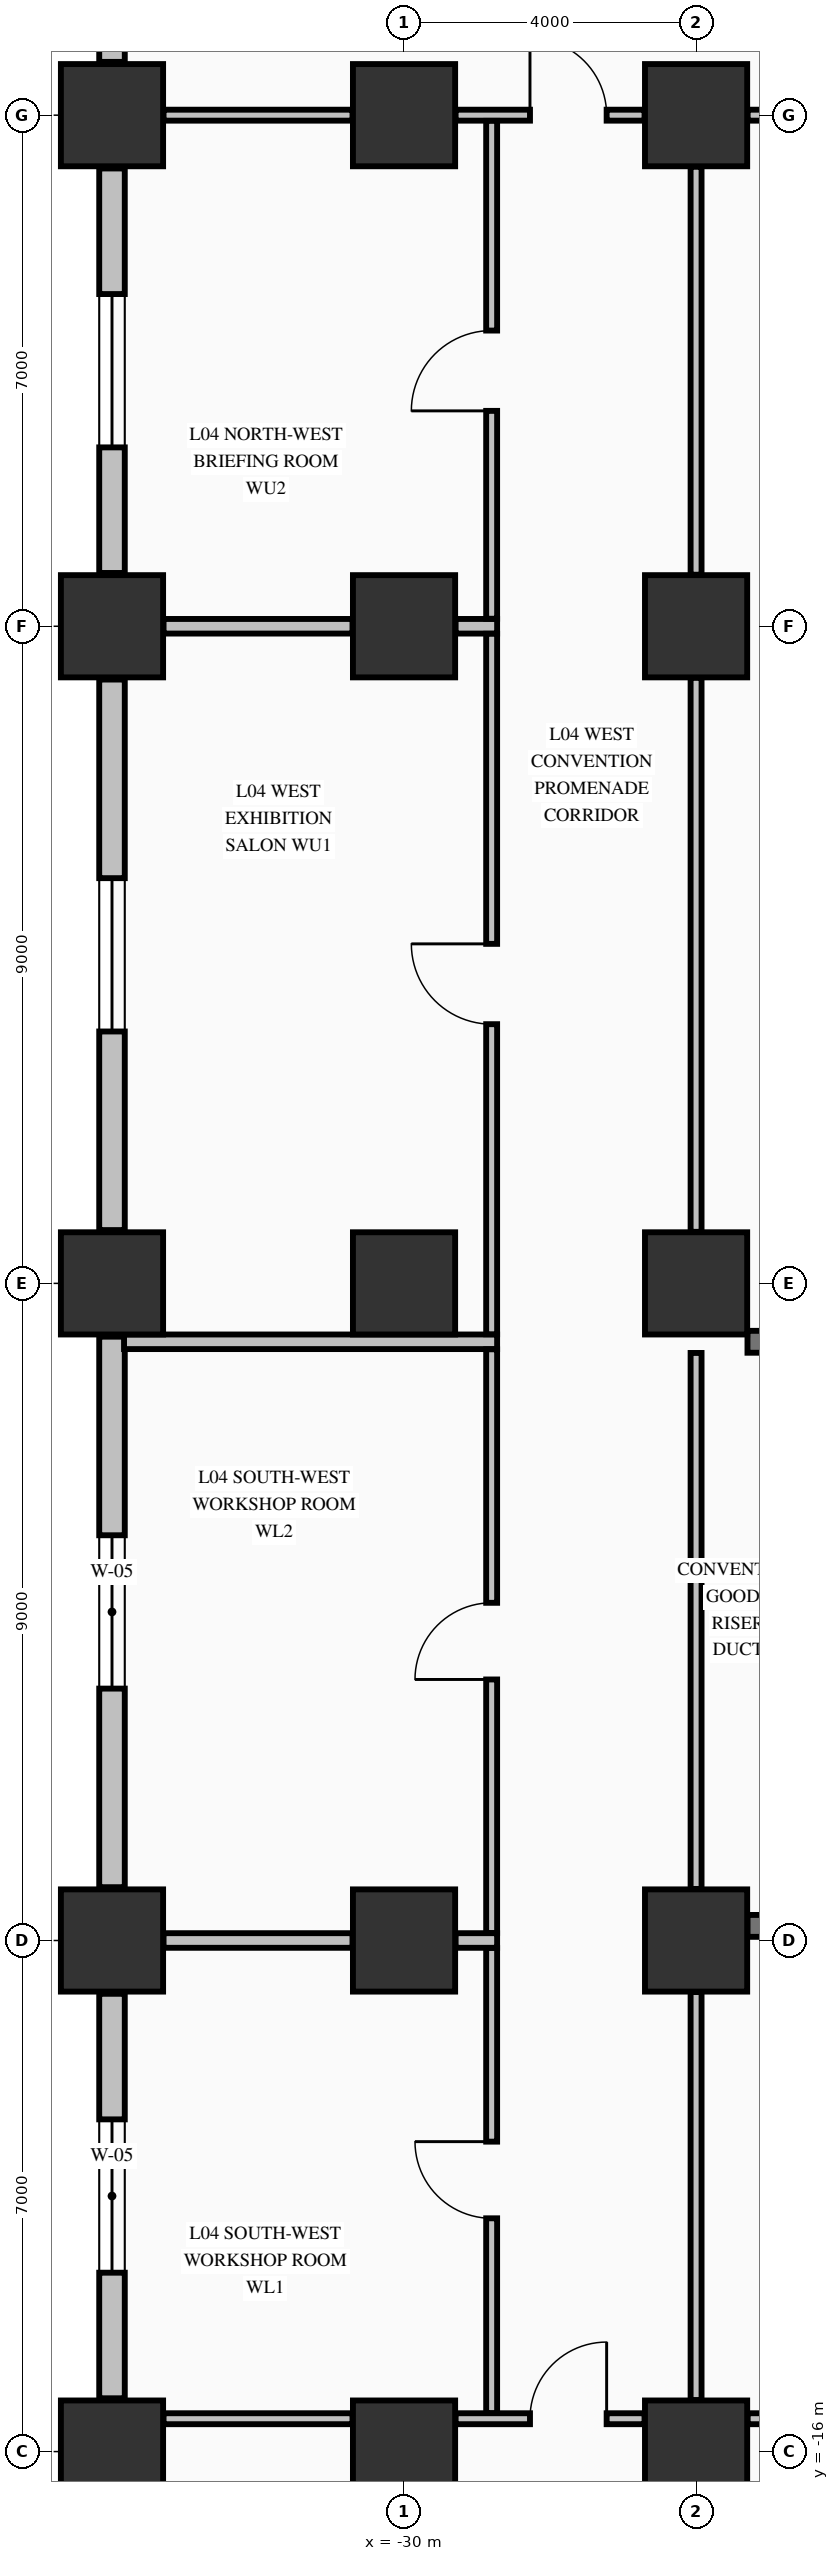
"""IFC4 building model, lengths in metres.
Left out: names, types, materials, properties, quantities, classifications, styles, units other than length and angle.
Written with IfcOpenShell. Run it as: python <this file> out.ifc"""

import sys

from ifc_helpers import new_model, si_unit, direction, frame, frame_2d, origin, origin_2d, place, context, subcontext, project, spatial, rectangle, extrude, element, fill, save


model = new_model("IFC4")
c1 = context("Model", 3, precision=1e-05, world=origin(), true_north=direction((0.0, 1.0)))
c2 = subcontext(c1, "Body", "Model", "MODEL_VIEW")
j1 = project(units=[si_unit("LENGTHUNIT", "METRE"), si_unit("PLANEANGLEUNIT", "RADIAN")], contexts=[c1])
p1 = place(None, origin())
s1 = spatial("IfcSite", under=j1, at=p1, CompositionType="ELEMENT")
p2 = place(p1, origin())
s2 = spatial("IfcBuilding", under=s1, at=p2, CompositionType="ELEMENT")
p3 = place(p2, frame((0.0, 0.0, 21.76)))
s3 = spatial("IfcBuildingStorey", under=s2, at=p3, CompositionType="ELEMENT", Elevation=21.76)
for number, where, z_axis, x_axis in (
    (1, (-34.0, -16.0, -0.45), (0.0, 0.0, 1.0), (1.0, 0.0, 0.0)),
    (2, (-34.0, -9.0, -0.45), (0.0, 0.0, 1.0), (1.0, 0.0, 0.0)),
    (3, (-34.0, 0.0, -0.45), (0.0, 0.0, 1.0), (1.0, 0.0, 0.0)),
    (4, (-34.0, 9.0, -0.45), (0.0, 0.0, 1.0), (1.0, 0.0, 0.0)),
    (5, (-34.0, 16.0, -0.45), (0.0, 0.0, 1.0), (1.0, 0.0, 0.0)),
    (6, (-30.0, -16.0, -0.45), (0.0, 0.0, 1.0), (1.0, 0.0, 0.0)),
    (7, (-30.0, -9.0, -0.45), (0.0, 0.0, 1.0), (1.0, 0.0, 0.0)),
    (8, (-30.0, 0.0, -0.45), (0.0, 0.0, 1.0), (1.0, 0.0, 0.0)),
    (9, (-30.0, 9.0, -0.45), (0.0, 0.0, 1.0), (1.0, 0.0, 0.0)),
    (10, (-30.0, 16.0, -0.45), (0.0, 0.0, 1.0), (1.0, 0.0, 0.0)),
    (11, (-26.0, -16.0, -0.45), (0.0, 0.0, 1.0), (1.0, 0.0, 0.0)),
    (12, (-26.0, -9.0, -0.45), (0.0, 0.0, 1.0), (1.0, 0.0, 0.0)),
    (13, (-26.0, 0.0, -0.45), (0.0, 0.0, 1.0), (1.0, 0.0, 0.0)),
    (14, (-26.0, 9.0, -0.45), (0.0, 0.0, 1.0), (1.0, 0.0, 0.0)),
    (15, (-26.0, 16.0, -0.45), (0.0, 0.0, 1.0), (1.0, 0.0, 0.0)),
):
    element("IfcColumn", number, at=place(p3, frame(where, z_axis=z_axis, x_axis=x_axis)), inside=s3, PredefinedType="COLUMN", context=c2, shape_type="SweptSolid", body=[
        extrude(rectangle(XDim=1.4, YDim=1.4, at=origin_2d()), origin(), (0.0, 0.0, 1.0), 5.44),
    ])
p4 = place(p3, frame((-34.0, -15.27, 0.0), z_axis=(0.0, 0.0, 1.0), x_axis=(0.0, 1.0, 0.0)))
e16 = element("IfcWall", 16, at=p4, inside=s3, PredefinedType="STANDARD", context=c2, shape_type="SweptSolid", body=[
    extrude(rectangle(XDim=5.54, YDim=0.35, at=frame_2d((2.77, 0.0))), origin(), (0.0, 0.0, 1.0), 3.332),
])
p5 = place(p4, frame((1.72, 0.0, 0.75)))
e17 = element("IfcOpeningElement", 17, at=p5, cuts=e16, PredefinedType="OPENING", context=c2, shape_type="SweptSolid", body=[
    extrude(rectangle(XDim=2.1, YDim=1.75, at=frame_2d((1.05, 0.875))), frame((0.0, 0.185, 0.0), z_axis=(0.0, -1.0, 0.0), x_axis=(1.0, 0.0, 0.0)), (0.0, 0.0, 1.0), 0.37),
])
p6 = place(p3, frame((-34.0, -8.27, 0.0), z_axis=(0.0, 0.0, 1.0), x_axis=(0.0, 1.0, 0.0)))
e18 = element("IfcWall", 18, at=p6, inside=s3, PredefinedType="STANDARD", context=c2, shape_type="SweptSolid", body=[
    extrude(rectangle(XDim=7.54, YDim=0.35, at=frame_2d((3.77, 0.0))), origin(), (0.0, 0.0, 1.0), 3.332),
])
p7 = place(p6, frame((2.72, 0.0, 0.75)))
e19 = element("IfcOpeningElement", 19, at=p7, cuts=e18, PredefinedType="OPENING", context=c2, shape_type="SweptSolid", body=[
    extrude(rectangle(XDim=2.1, YDim=1.75, at=frame_2d((1.05, 0.875))), frame((0.0, 0.185, 0.0), z_axis=(0.0, -1.0, 0.0), x_axis=(1.0, 0.0, 0.0)), (0.0, 0.0, 1.0), 0.37),
])
p8 = place(p3, frame((-34.0, 0.73, 0.0), z_axis=(0.0, 0.0, 1.0), x_axis=(0.0, 1.0, 0.0)))
e20 = element("IfcWall", 20, at=p8, inside=s3, PredefinedType="STANDARD", context=c2, shape_type="SweptSolid", body=[
    extrude(rectangle(XDim=7.54, YDim=0.35, at=frame_2d((3.77, 0.0))), origin(), (0.0, 0.0, 1.0), 3.332),
])
p9 = place(p8, frame((2.72, 0.0, 0.75)))
e21 = element("IfcOpeningElement", 21, at=p9, cuts=e20, PredefinedType="OPENING", context=c2, shape_type="SweptSolid", body=[
    extrude(rectangle(XDim=2.1, YDim=1.75, at=frame_2d((1.05, 0.875))), frame((0.0, 0.185, 0.0), z_axis=(0.0, -1.0, 0.0), x_axis=(1.0, 0.0, 0.0)), (0.0, 0.0, 1.0), 0.37),
])
p10 = place(p3, frame((-34.0, 9.73, 0.0), z_axis=(0.0, 0.0, 1.0), x_axis=(0.0, 1.0, 0.0)))
e22 = element("IfcWall", 22, at=p10, inside=s3, PredefinedType="STANDARD", context=c2, shape_type="SweptSolid", body=[
    extrude(rectangle(XDim=5.54, YDim=0.35, at=frame_2d((2.77, 0.0))), origin(), (0.0, 0.0, 1.0), 3.332),
])
p11 = place(p10, frame((1.72, 0.0, 0.75)))
e23 = element("IfcOpeningElement", 23, at=p11, cuts=e22, PredefinedType="OPENING", context=c2, shape_type="SweptSolid", body=[
    extrude(rectangle(XDim=2.1, YDim=1.75, at=frame_2d((1.05, 0.875))), frame((0.0, 0.185, 0.0), z_axis=(0.0, -1.0, 0.0), x_axis=(1.0, 0.0, 0.0)), (0.0, 0.0, 1.0), 0.37),
])
p12 = place(p3, frame((-34.0, 16.73, 0.0), z_axis=(0.0, 0.0, 1.0), x_axis=(0.0, 1.0, 0.0)))
e24 = element("IfcWall", 24, at=p12, inside=s3, PredefinedType="STANDARD", context=c2, shape_type="SweptSolid", body=[
    extrude(rectangle(XDim=4.54, YDim=0.35, at=frame_2d((2.27, 0.0))), origin(), (0.0, 0.0, 1.0), 3.332),
])
for number, where, z_axis, x_axis in (
    (25, (-25.296, -8.8, 0.0), (0.0, 0.0, 1.0), (1.0, 0.0, 0.0)),
    (26, (-25.296, -0.8, 0.0), (0.0, 0.0, 1.0), (1.0, 0.0, 0.0)),
):
    element("IfcWall", number, at=place(p3, frame(where, z_axis=z_axis, x_axis=x_axis)), inside=s3, PredefinedType="SHEAR", context=c2, shape_type="SweptSolid", body=[
        extrude(rectangle(XDim=3.046, YDim=0.3, at=frame_2d((1.523, 0.0))), origin(), (0.0, 0.0, 1.0), 4.99),
    ])
p13 = place(p3, frame((-33.294, -15.55, 0.0), z_axis=(0.0, 0.0, 1.0), x_axis=(1.0, 0.0, 0.0)))
e27 = element("IfcWall", 27, at=p13, inside=s3, PredefinedType="PARTITIONING", context=c2, shape_type="SweptSolid", body=[
    extrude(rectangle(XDim=2.588, YDim=0.15, at=frame_2d((1.294, 0.0))), origin(), (0.0, 0.0, 1.0), 3.332),
])
p14 = place(p3, frame((-29.294, -15.55, 0.0), z_axis=(0.0, 0.0, 1.0), x_axis=(1.0, 0.0, 0.0)))
e28 = element("IfcWall", 28, at=p14, inside=s3, PredefinedType="PARTITIONING", context=c2, shape_type="SweptSolid", body=[
    extrude(rectangle(XDim=2.588, YDim=0.15, at=frame_2d((1.294, 0.0))), origin(), (0.0, 0.0, 1.0), 3.332),
])
p15 = place(p14, frame((1.019, 0.0, 0.0)))
e29 = element("IfcOpeningElement", 29, at=p15, cuts=e28, PredefinedType="OPENING", context=c2, shape_type="SweptSolid", body=[
    extrude(rectangle(XDim=1.05, YDim=2.15, at=frame_2d((0.525, 1.075))), frame((0.0, 0.085, 0.0), z_axis=(0.0, -1.0, 0.0), x_axis=(1.0, 0.0, 0.0)), (0.0, 0.0, 1.0), 0.17),
])
p16 = place(p3, frame((-25.294, -15.55, 0.0), z_axis=(0.0, 0.0, 1.0), x_axis=(1.0, 0.0, 0.0)))
e30 = element("IfcWall", 30, at=p16, inside=s3, PredefinedType="PARTITIONING", context=c2, shape_type="SweptSolid", body=[
    extrude(rectangle(XDim=4.488, YDim=0.15, at=frame_2d((2.244, 0.0))), origin(), (0.0, 0.0, 1.0), 3.332),
])
p17 = place(p16, frame((0.619, 0.0, 0.0)))
e31 = element("IfcOpeningElement", 31, at=p17, cuts=e30, PredefinedType="OPENING", context=c2, shape_type="SweptSolid", body=[
    extrude(rectangle(XDim=0.95, YDim=2.15, at=frame_2d((0.475, 1.075))), frame((0.0, 0.085, 0.0), z_axis=(0.0, -1.0, 0.0), x_axis=(1.0, 0.0, 0.0)), (0.0, 0.0, 1.0), 0.17),
])
p18 = place(p3, frame((-33.294, -9.0, 0.0), z_axis=(0.0, 0.0, 1.0), x_axis=(1.0, 0.0, 0.0)))
e32 = element("IfcWall", 32, at=p18, inside=s3, PredefinedType="PARTITIONING", context=c2, shape_type="SweptSolid", body=[
    extrude(rectangle(XDim=2.588, YDim=0.2, at=frame_2d((1.294, 0.0))), origin(), (0.0, 0.0, 1.0), 3.332),
])
p19 = place(p3, frame((-29.294, -9.0, 0.0), z_axis=(0.0, 0.0, 1.0), x_axis=(1.0, 0.0, 0.0)))
e33 = element("IfcWall", 33, at=p19, inside=s3, PredefinedType="PARTITIONING", context=c2, shape_type="SweptSolid", body=[
    extrude(rectangle(XDim=0.569, YDim=0.2, at=frame_2d((0.284, 0.0))), origin(), (0.0, 0.0, 1.0), 3.332),
])
p20 = place(p3, frame((-33.835, -0.8, 0.0), z_axis=(0.0, 0.0, 1.0), x_axis=(1.0, 0.0, 0.0)))
e34 = element("IfcWall", 34, at=p20, inside=s3, PredefinedType="PARTITIONING", context=c2, shape_type="SweptSolid", body=[
    extrude(rectangle(XDim=5.11, YDim=0.2, at=frame_2d((2.555, 0.0))), origin(), (0.0, 0.0, 1.0), 4.99),
])
p21 = place(p3, frame((-33.294, 9.0, 0.0), z_axis=(0.0, 0.0, 1.0), x_axis=(1.0, 0.0, 0.0)))
e35 = element("IfcWall", 35, at=p21, inside=s3, PredefinedType="PARTITIONING", context=c2, shape_type="SweptSolid", body=[
    extrude(rectangle(XDim=2.588, YDim=0.2, at=frame_2d((1.294, 0.0))), origin(), (0.0, 0.0, 1.0), 3.332),
])
p22 = place(p3, frame((-29.294, 9.0, 0.0), z_axis=(0.0, 0.0, 1.0), x_axis=(1.0, 0.0, 0.0)))
e36 = element("IfcWall", 36, at=p22, inside=s3, PredefinedType="PARTITIONING", context=c2, shape_type="SweptSolid", body=[
    extrude(rectangle(XDim=0.569, YDim=0.2, at=frame_2d((0.284, 0.0))), origin(), (0.0, 0.0, 1.0), 3.332),
])
p23 = place(p3, frame((-33.294, 16.0, 0.0), z_axis=(0.0, 0.0, 1.0), x_axis=(1.0, 0.0, 0.0)))
e37 = element("IfcWall", 37, at=p23, inside=s3, PredefinedType="PARTITIONING", context=c2, shape_type="SweptSolid", body=[
    extrude(rectangle(XDim=2.588, YDim=0.15, at=frame_2d((1.294, 0.0))), origin(), (0.0, 0.0, 1.0), 3.332),
])
p24 = place(p3, frame((-29.294, 16.0, 0.0), z_axis=(0.0, 0.0, 1.0), x_axis=(1.0, 0.0, 0.0)))
e38 = element("IfcWall", 38, at=p24, inside=s3, PredefinedType="PARTITIONING", context=c2, shape_type="SweptSolid", body=[
    extrude(rectangle(XDim=2.588, YDim=0.15, at=frame_2d((1.294, 0.0))), origin(), (0.0, 0.0, 1.0), 3.332),
])
p25 = place(p24, frame((1.019, 0.0, 0.0)))
e39 = element("IfcOpeningElement", 39, at=p25, cuts=e38, PredefinedType="OPENING", context=c2, shape_type="SweptSolid", body=[
    extrude(rectangle(XDim=1.05, YDim=2.15, at=frame_2d((0.525, 1.075))), frame((0.0, 0.085, 0.0), z_axis=(0.0, -1.0, 0.0), x_axis=(1.0, 0.0, 0.0)), (0.0, 0.0, 1.0), 0.17),
])
p26 = place(p3, frame((-25.294, 16.0, 0.0), z_axis=(0.0, 0.0, 1.0), x_axis=(1.0, 0.0, 0.0)))
e40 = element("IfcWall", 40, at=p26, inside=s3, PredefinedType="PARTITIONING", context=c2, shape_type="SweptSolid", body=[
    extrude(rectangle(XDim=4.488, YDim=0.15, at=frame_2d((2.244, 0.0))), origin(), (0.0, 0.0, 1.0), 3.332),
])
p27 = place(p26, frame((3.238, 0.0, 0.0)))
e41 = element("IfcOpeningElement", 41, at=p27, cuts=e40, PredefinedType="OPENING", context=c2, shape_type="SweptSolid", body=[
    extrude(rectangle(XDim=1.1, YDim=2.15, at=frame_2d((0.55, 1.075))), frame((0.0, 0.085, 0.0), z_axis=(0.0, -1.0, 0.0), x_axis=(1.0, 0.0, 0.0)), (0.0, 0.0, 1.0), 0.17),
])
p28 = place(p3, frame((-28.8, -15.472, 0.0), z_axis=(0.0, 0.0, 1.0), x_axis=(0.0, 1.0, 0.0)))
e42 = element("IfcWall", 42, at=p28, inside=s3, PredefinedType="PARTITIONING", context=c2, shape_type="SweptSolid", body=[
    extrude(rectangle(XDim=6.369, YDim=0.15, at=frame_2d((3.185, 0.0))), origin(), (0.0, 0.0, 1.0), 4.99),
])
p29 = place(p28, frame((2.667, 0.0, 0.0)))
e43 = element("IfcOpeningElement", 43, at=p29, cuts=e42, PredefinedType="OPENING", context=c2, shape_type="SweptSolid", body=[
    extrude(rectangle(XDim=1.05, YDim=2.15, at=frame_2d((0.525, 1.075))), frame((0.0, 0.085, 0.0), z_axis=(0.0, -1.0, 0.0), x_axis=(1.0, 0.0, 0.0)), (0.0, 0.0, 1.0), 0.17),
])
p30 = place(p3, frame((-28.8, -8.897, 0.0), z_axis=(0.0, 0.0, 1.0), x_axis=(0.0, 1.0, 0.0)))
e44 = element("IfcWall", 44, at=p30, inside=s3, PredefinedType="PARTITIONING", context=c2, shape_type="SweptSolid", body=[
    extrude(rectangle(XDim=7.994, YDim=0.15, at=frame_2d((3.997, 0.0))), origin(), (0.0, 0.0, 1.0), 4.99),
])
p31 = place(p30, frame((3.472, 0.0, 0.0)))
e45 = element("IfcOpeningElement", 45, at=p31, cuts=e44, PredefinedType="OPENING", context=c2, shape_type="SweptSolid", body=[
    extrude(rectangle(XDim=1.05, YDim=2.15, at=frame_2d((0.525, 1.075))), frame((0.0, 0.085, 0.0), z_axis=(0.0, -1.0, 0.0), x_axis=(1.0, 0.0, 0.0)), (0.0, 0.0, 1.0), 0.17),
])
p32 = place(p3, frame((-28.8, -0.697, 0.0), z_axis=(0.0, 0.0, 1.0), x_axis=(0.0, 1.0, 0.0)))
e46 = element("IfcWall", 46, at=p32, inside=s3, PredefinedType="PARTITIONING", context=c2, shape_type="SweptSolid", body=[
    extrude(rectangle(XDim=9.594, YDim=0.15, at=frame_2d((4.797, 0.0))), origin(), (0.0, 0.0, 1.0), 4.99),
])
p33 = place(p32, frame((4.247, 0.0, 0.0)))
e47 = element("IfcOpeningElement", 47, at=p33, cuts=e46, PredefinedType="OPENING", context=c2, shape_type="SweptSolid", body=[
    extrude(rectangle(XDim=1.1, YDim=2.15, at=frame_2d((0.55, 1.075))), frame((0.0, 0.085, 0.0), z_axis=(0.0, -1.0, 0.0), x_axis=(1.0, 0.0, 0.0)), (0.0, 0.0, 1.0), 0.17),
])
p34 = place(p3, frame((-28.8, 9.103, 0.0), z_axis=(0.0, 0.0, 1.0), x_axis=(0.0, 1.0, 0.0)))
e48 = element("IfcWall", 48, at=p34, inside=s3, PredefinedType="PARTITIONING", context=c2, shape_type="SweptSolid", body=[
    extrude(rectangle(XDim=6.819, YDim=0.15, at=frame_2d((3.41, 0.0))), origin(), (0.0, 0.0, 1.0), 4.99),
])
p35 = place(p34, frame((2.847, 0.0, 0.0)))
e49 = element("IfcOpeningElement", 49, at=p35, cuts=e48, PredefinedType="OPENING", context=c2, shape_type="SweptSolid", body=[
    extrude(rectangle(XDim=1.1, YDim=2.15, at=frame_2d((0.55, 1.075))), frame((0.0, 0.085, 0.0), z_axis=(0.0, -1.0, 0.0), x_axis=(1.0, 0.0, 0.0)), (0.0, 0.0, 1.0), 0.17),
])
p36 = place(p3, frame((-26.0, -15.294, 0.0), z_axis=(0.0, 0.0, 1.0), x_axis=(0.0, 1.0, 0.0)))
e50 = element("IfcWall", 50, at=p36, inside=s3, PredefinedType="PARTITIONING", context=c2, shape_type="SweptSolid", body=[
    extrude(rectangle(XDim=5.588, YDim=0.15, at=frame_2d((2.794, 0.0))), origin(), (0.0, 0.0, 1.0), 3.332),
])
p37 = place(p3, frame((-26.0, -8.294, 0.0), z_axis=(0.0, 0.0, 1.0), x_axis=(0.0, 1.0, 0.0)))
e51 = element("IfcWall", 51, at=p37, inside=s3, PredefinedType="PARTITIONING", context=c2, shape_type="SweptSolid", body=[
    extrude(rectangle(XDim=7.341, YDim=0.15, at=frame_2d((3.67, 0.0))), origin(), (0.0, 0.0, 1.0), 3.332),
])
p38 = place(p3, frame((-26.0, 0.706, 0.0), z_axis=(0.0, 0.0, 1.0), x_axis=(0.0, 1.0, 0.0)))
e52 = element("IfcWall", 52, at=p38, inside=s3, PredefinedType="PARTITIONING", context=c2, shape_type="SweptSolid", body=[
    extrude(rectangle(XDim=7.588, YDim=0.15, at=frame_2d((3.794, 0.0))), origin(), (0.0, 0.0, 1.0), 3.332),
])
p39 = place(p3, frame((-26.0, 9.706, 0.0), z_axis=(0.0, 0.0, 1.0), x_axis=(0.0, 1.0, 0.0)))
e53 = element("IfcWall", 53, at=p39, inside=s3, PredefinedType="PARTITIONING", context=c2, shape_type="SweptSolid", body=[
    extrude(rectangle(XDim=5.588, YDim=0.15, at=frame_2d((2.794, 0.0))), origin(), (0.0, 0.0, 1.0), 3.332),
])
p40 = place(p5, origin())
e54 = element("IfcWindow", 54, at=p40, inside=s3, PartitioningType="SINGLE_PANEL", PredefinedType="WINDOW", context=c2, shape_type="SweptSolid", body=[
    extrude(rectangle(XDim=2.1, YDim=1.75, at=frame_2d((1.05, 0.875))), frame((0.0, 0.03, 0.0), z_axis=(0.0, -1.0, 0.0), x_axis=(1.0, 0.0, 0.0)), (0.0, 0.0, 1.0), 0.06),
])
fill(e17, e54)
p41 = place(p7, origin())
e55 = element("IfcWindow", 55, at=p41, inside=s3, PartitioningType="SINGLE_PANEL", PredefinedType="WINDOW", context=c2, shape_type="SweptSolid", body=[
    extrude(rectangle(XDim=2.1, YDim=1.75, at=frame_2d((1.05, 0.875))), frame((0.0, 0.03, 0.0), z_axis=(0.0, -1.0, 0.0), x_axis=(1.0, 0.0, 0.0)), (0.0, 0.0, 1.0), 0.06),
])
fill(e19, e55)
p42 = place(p9, origin())
e56 = element("IfcWindow", 56, at=p42, inside=s3, PartitioningType="SINGLE_PANEL", PredefinedType="WINDOW", context=c2, shape_type="SweptSolid", body=[
    extrude(rectangle(XDim=2.1, YDim=1.75, at=frame_2d((1.05, 0.875))), frame((0.0, 0.03, 0.0), z_axis=(0.0, -1.0, 0.0), x_axis=(1.0, 0.0, 0.0)), (0.0, 0.0, 1.0), 0.06),
])
fill(e21, e56)
p43 = place(p11, origin())
e57 = element("IfcWindow", 57, at=p43, inside=s3, PartitioningType="SINGLE_PANEL", PredefinedType="WINDOW", context=c2, shape_type="SweptSolid", body=[
    extrude(rectangle(XDim=2.1, YDim=1.75, at=frame_2d((1.05, 0.875))), frame((0.0, 0.03, 0.0), z_axis=(0.0, -1.0, 0.0), x_axis=(1.0, 0.0, 0.0)), (0.0, 0.0, 1.0), 0.06),
])
fill(e23, e57)
p44 = place(p15, origin())
e58 = element("IfcDoor", 58, at=p44, inside=s3, OperationType="SINGLE_SWING_RIGHT", PredefinedType="DOOR", context=c2, shape_type="SweptSolid", body=[
    extrude(rectangle(XDim=1.05, YDim=2.15, at=frame_2d((0.525, 1.075))), frame((0.0, 0.025, 0.0), z_axis=(0.0, -1.0, 0.0), x_axis=(1.0, 0.0, 0.0)), (0.0, 0.0, 1.0), 0.05),
])
fill(e29, e58)
p45 = place(p25, origin())
e59 = element("IfcDoor", 59, at=p45, inside=s3, OperationType="SINGLE_SWING_LEFT", PredefinedType="DOOR", context=c2, shape_type="SweptSolid", body=[
    extrude(rectangle(XDim=1.05, YDim=2.15, at=frame_2d((0.525, 1.075))), frame((0.0, 0.025, 0.0), z_axis=(0.0, -1.0, 0.0), x_axis=(1.0, 0.0, 0.0)), (0.0, 0.0, 1.0), 0.05),
])
fill(e39, e59)
p46 = place(p29, origin())
e60 = element("IfcDoor", 60, at=p46, inside=s3, OperationType="SINGLE_SWING_RIGHT", PredefinedType="DOOR", context=c2, shape_type="SweptSolid", body=[
    extrude(rectangle(XDim=1.05, YDim=2.15, at=frame_2d((0.525, 1.075))), frame((0.0, 0.025, 0.0), z_axis=(0.0, -1.0, 0.0), x_axis=(1.0, 0.0, 0.0)), (0.0, 0.0, 1.0), 0.05),
])
fill(e43, e60)
p47 = place(p31, origin())
e61 = element("IfcDoor", 61, at=p47, inside=s3, OperationType="SINGLE_SWING_LEFT", PredefinedType="DOOR", context=c2, shape_type="SweptSolid", body=[
    extrude(rectangle(XDim=1.05, YDim=2.15, at=frame_2d((0.525, 1.075))), frame((0.0, 0.025, 0.0), z_axis=(0.0, -1.0, 0.0), x_axis=(1.0, 0.0, 0.0)), (0.0, 0.0, 1.0), 0.05),
])
fill(e45, e61)
p48 = place(p33, origin())
e62 = element("IfcDoor", 62, at=p48, inside=s3, OperationType="SINGLE_SWING_RIGHT", PredefinedType="DOOR", context=c2, shape_type="SweptSolid", body=[
    extrude(rectangle(XDim=1.1, YDim=2.15, at=frame_2d((0.55, 1.075))), frame((0.0, 0.025, 0.0), z_axis=(0.0, -1.0, 0.0), x_axis=(1.0, 0.0, 0.0)), (0.0, 0.0, 1.0), 0.05),
])
fill(e47, e62)
p49 = place(p35, origin())
e63 = element("IfcDoor", 63, at=p49, inside=s3, OperationType="SINGLE_SWING_LEFT", PredefinedType="DOOR", context=c2, shape_type="SweptSolid", body=[
    extrude(rectangle(XDim=1.1, YDim=2.15, at=frame_2d((0.55, 1.075))), frame((0.0, 0.025, 0.0), z_axis=(0.0, -1.0, 0.0), x_axis=(1.0, 0.0, 0.0)), (0.0, 0.0, 1.0), 0.05),
])
fill(e49, e63)
save(model, sys.argv[1])
